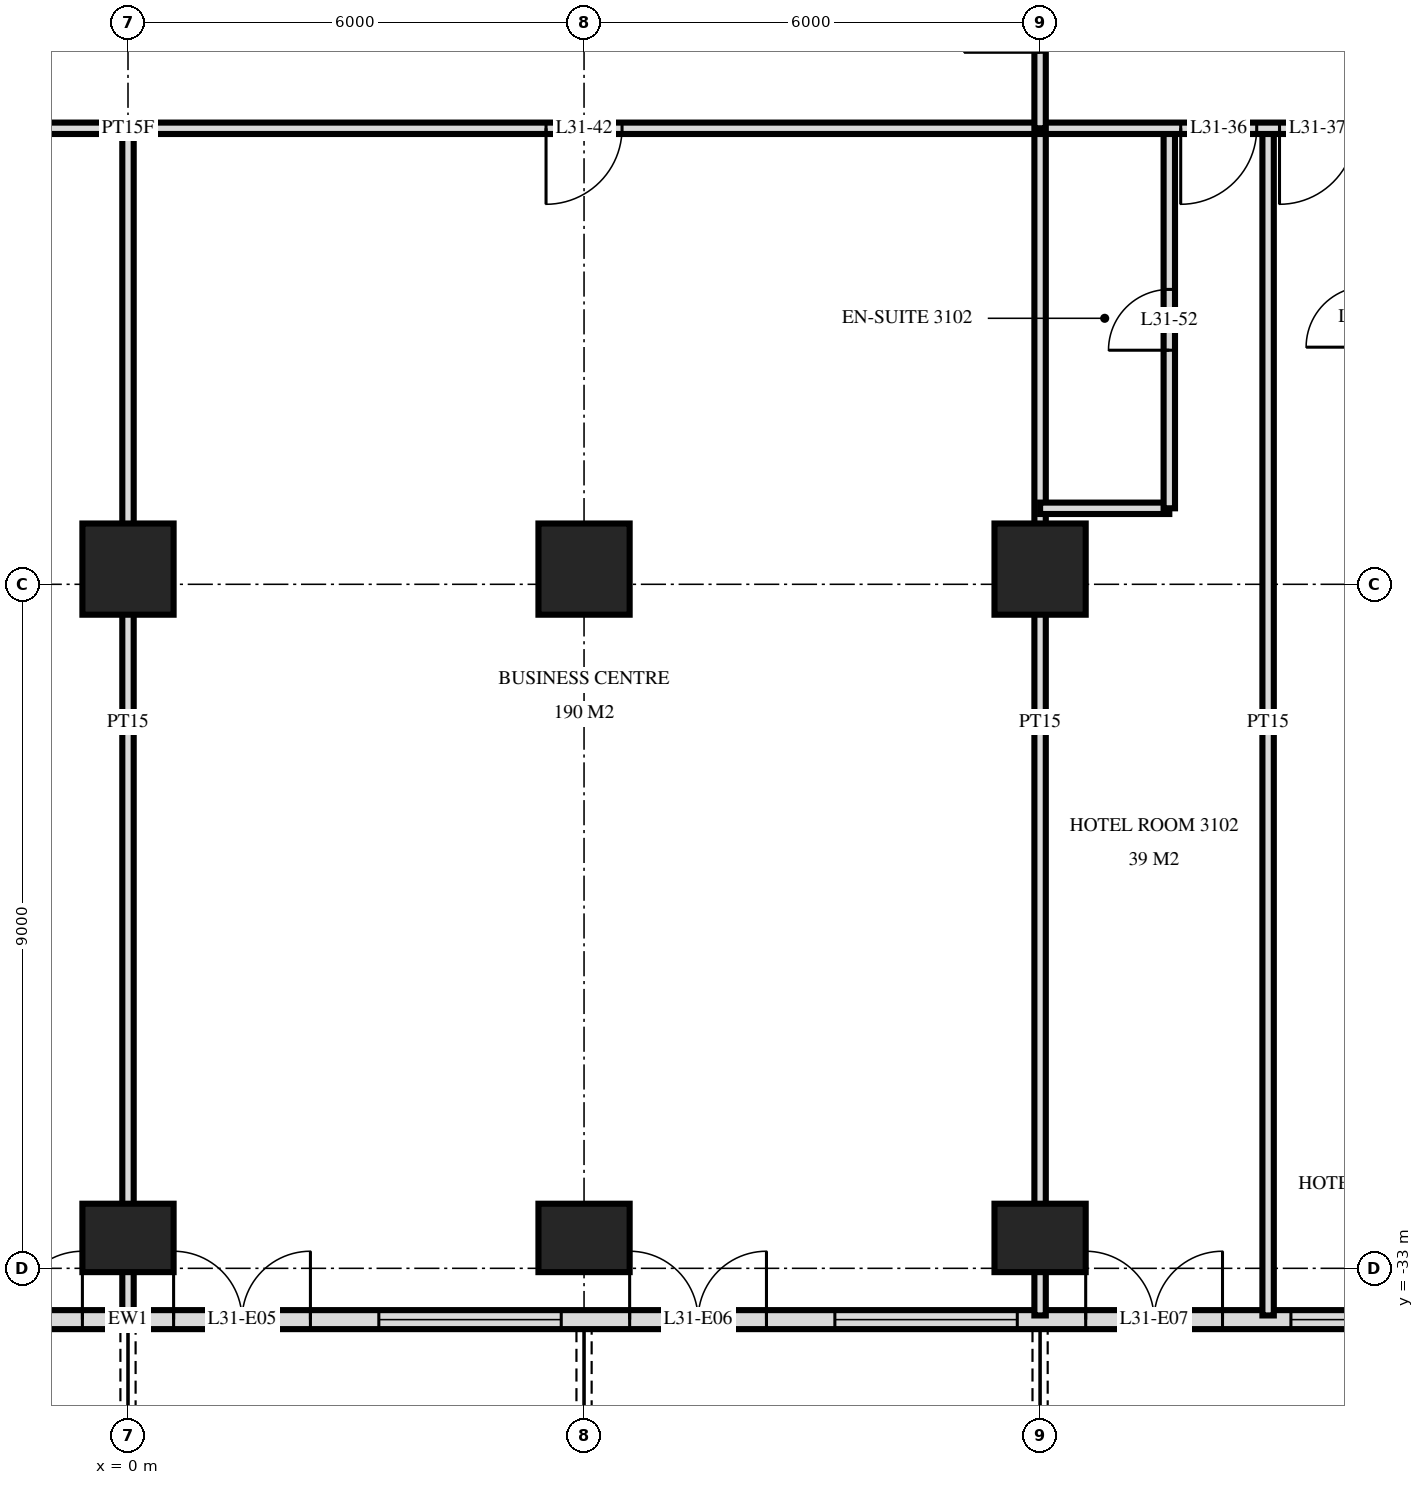
"""IFC4 building model, lengths in metres.
Left out: names, types, materials, properties, quantities, classifications, styles, units other than length and angle.
Written with IfcOpenShell. Run it as: python <this file> out.ifc"""

import sys

from ifc_helpers import new_model, si_unit, direction, frame, frame_2d, origin, origin_2d, place, context, subcontext, project, spatial, rectangle, extrude, element, fill, save


model = new_model("IFC4")
c1 = context("Model", 3, precision=1e-05, world=origin(), true_north=direction((0.0, 1.0)))
c2 = subcontext(c1, "Body", "Model", "MODEL_VIEW")
j1 = project(units=[si_unit("LENGTHUNIT", "METRE"), si_unit("PLANEANGLEUNIT", "RADIAN")], contexts=[c1])
p1 = place(None, origin())
s1 = spatial("IfcSite", under=j1, at=p1, CompositionType="ELEMENT")
p2 = place(p1, origin())
s2 = spatial("IfcBuilding", under=s1, at=p2, CompositionType="ELEMENT")
p3 = place(p2, frame((0.0, 0.0, 123.6)))
s3 = spatial("IfcBuildingStorey", under=s2, at=p3, CompositionType="ELEMENT", Elevation=123.6)
p4 = place(p3, frame((0.0, -32.6, 0.0), z_axis=(0.0, 0.0, 1.0), x_axis=(1.0, 0.0, 0.0)))
e1 = element("IfcColumn", 1, at=p4, inside=s3, PredefinedType="COLUMN", context=c2, shape_type="SweptSolid", body=[
    extrude(rectangle(XDim=1.2, YDim=0.9, at=origin_2d()), origin(), (0.0, 0.0, 1.0), 3.6),
])
p5 = place(p3, frame((0.0, -23.8, 0.0), z_axis=(0.0, 0.0, 1.0), x_axis=(1.0, 0.0, 0.0)))
e2 = element("IfcColumn", 2, at=p5, inside=s3, PredefinedType="COLUMN", context=c2, shape_type="SweptSolid", body=[
    extrude(rectangle(XDim=1.2, YDim=1.2, at=origin_2d()), origin(), (0.0, 0.0, 1.0), 3.6),
])
p6 = place(p3, frame((6.0, -32.6, 0.0), z_axis=(0.0, 0.0, 1.0), x_axis=(1.0, 0.0, 0.0)))
e3 = element("IfcColumn", 3, at=p6, inside=s3, PredefinedType="COLUMN", context=c2, shape_type="SweptSolid", body=[
    extrude(rectangle(XDim=1.2, YDim=0.9, at=origin_2d()), origin(), (0.0, 0.0, 1.0), 3.6),
])
p7 = place(p3, frame((6.0, -23.8, 0.0), z_axis=(0.0, 0.0, 1.0), x_axis=(1.0, 0.0, 0.0)))
e4 = element("IfcColumn", 4, at=p7, inside=s3, PredefinedType="COLUMN", context=c2, shape_type="SweptSolid", body=[
    extrude(rectangle(XDim=1.2, YDim=1.2, at=origin_2d()), origin(), (0.0, 0.0, 1.0), 3.6),
])
p8 = place(p3, frame((12.0, -32.6, 0.0), z_axis=(0.0, 0.0, 1.0), x_axis=(1.0, 0.0, 0.0)))
e5 = element("IfcColumn", 5, at=p8, inside=s3, PredefinedType="COLUMN", context=c2, shape_type="SweptSolid", body=[
    extrude(rectangle(XDim=1.2, YDim=0.9, at=origin_2d()), origin(), (0.0, 0.0, 1.0), 3.6),
])
p9 = place(p3, frame((12.0, -23.8, 0.0), z_axis=(0.0, 0.0, 1.0), x_axis=(1.0, 0.0, 0.0)))
e6 = element("IfcColumn", 6, at=p9, inside=s3, PredefinedType="COLUMN", context=c2, shape_type="SweptSolid", body=[
    extrude(rectangle(XDim=1.2, YDim=1.2, at=origin_2d()), origin(), (0.0, 0.0, 1.0), 3.6),
])
p10 = place(p3, frame((-23.675, -33.675, 0.0), z_axis=(0.0, 0.0, 1.0), x_axis=(1.0, 0.0, 0.0)))
e7 = element("IfcWall", 7, at=p10, inside=s3, PredefinedType="SOLIDWALL", context=c2, shape_type="SweptSolid", body=[
    extrude(rectangle(XDim=47.351, YDim=0.25, at=frame_2d((23.675, 0.0))), origin(), (0.0, 0.0, 1.0), 3.32),
])
p11 = place(p10, frame((3.425, 0.0, 0.0)))
e8 = element("IfcOpeningElement", 8, at=p11, cuts=e7, PredefinedType="OPENING", context=c2, shape_type="SweptSolid", body=[
    extrude(rectangle(XDim=1.8, YDim=2.4, at=frame_2d((0.9, 1.2))), frame((0.0, 0.135, 0.0), z_axis=(0.0, -1.0, 0.0), x_axis=(1.0, 0.0, 0.0)), (0.0, 0.0, 1.0), 0.27),
])
p12 = place(p10, frame((6.275, 0.0, 0.0)))
e9 = element("IfcOpeningElement", 9, at=p12, cuts=e7, PredefinedType="OPENING", context=c2, shape_type="SweptSolid", body=[
    extrude(rectangle(XDim=1.8, YDim=2.4, at=frame_2d((0.9, 1.2))), frame((0.0, 0.135, 0.0), z_axis=(0.0, -1.0, 0.0), x_axis=(1.0, 0.0, 0.0)), (0.0, 0.0, 1.0), 0.27),
])
p13 = place(p10, frame((8.975, 0.0, 0.3)))
e10 = element("IfcOpeningElement", 10, at=p13, cuts=e7, PredefinedType="OPENING", context=c2, shape_type="SweptSolid", body=[
    extrude(rectangle(XDim=2.4, YDim=2.1, at=frame_2d((1.2, 1.05))), frame((0.0, 0.135, 0.0), z_axis=(0.0, -1.0, 0.0), x_axis=(1.0, 0.0, 0.0)), (0.0, 0.0, 1.0), 0.27),
])
p14 = place(p10, frame((12.275, 0.0, 0.0)))
e11 = element("IfcOpeningElement", 11, at=p14, cuts=e7, PredefinedType="OPENING", context=c2, shape_type="SweptSolid", body=[
    extrude(rectangle(XDim=1.8, YDim=2.4, at=frame_2d((0.9, 1.2))), frame((0.0, 0.135, 0.0), z_axis=(0.0, -1.0, 0.0), x_axis=(1.0, 0.0, 0.0)), (0.0, 0.0, 1.0), 0.27),
])
p15 = place(p10, frame((14.975, 0.0, 0.3)))
e12 = element("IfcOpeningElement", 12, at=p15, cuts=e7, PredefinedType="OPENING", context=c2, shape_type="SweptSolid", body=[
    extrude(rectangle(XDim=2.4, YDim=2.1, at=frame_2d((1.2, 1.05))), frame((0.0, 0.135, 0.0), z_axis=(0.0, -1.0, 0.0), x_axis=(1.0, 0.0, 0.0)), (0.0, 0.0, 1.0), 0.27),
])
p16 = place(p10, frame((17.975, 0.0, 0.3)))
e13 = element("IfcOpeningElement", 13, at=p16, cuts=e7, PredefinedType="OPENING", context=c2, shape_type="SweptSolid", body=[
    extrude(rectangle(XDim=2.4, YDim=2.1, at=frame_2d((1.2, 1.05))), frame((0.0, 0.135, 0.0), z_axis=(0.0, -1.0, 0.0), x_axis=(1.0, 0.0, 0.0)), (0.0, 0.0, 1.0), 0.27),
])
p17 = place(p10, frame((21.275, 0.0, 0.0)))
e14 = element("IfcOpeningElement", 14, at=p17, cuts=e7, PredefinedType="OPENING", context=c2, shape_type="SweptSolid", body=[
    extrude(rectangle(XDim=1.8, YDim=2.4, at=frame_2d((0.9, 1.2))), frame((0.0, 0.135, 0.0), z_axis=(0.0, -1.0, 0.0), x_axis=(1.0, 0.0, 0.0)), (0.0, 0.0, 1.0), 0.27),
])
p18 = place(p10, frame((24.275, 0.0, 0.0)))
e15 = element("IfcOpeningElement", 15, at=p18, cuts=e7, PredefinedType="OPENING", context=c2, shape_type="SweptSolid", body=[
    extrude(rectangle(XDim=1.8, YDim=2.4, at=frame_2d((0.9, 1.2))), frame((0.0, 0.135, 0.0), z_axis=(0.0, -1.0, 0.0), x_axis=(1.0, 0.0, 0.0)), (0.0, 0.0, 1.0), 0.27),
])
p19 = place(p10, frame((26.975, 0.0, 0.3)))
e16 = element("IfcOpeningElement", 16, at=p19, cuts=e7, PredefinedType="OPENING", context=c2, shape_type="SweptSolid", body=[
    extrude(rectangle(XDim=2.4, YDim=2.1, at=frame_2d((1.2, 1.05))), frame((0.0, 0.135, 0.0), z_axis=(0.0, -1.0, 0.0), x_axis=(1.0, 0.0, 0.0)), (0.0, 0.0, 1.0), 0.27),
])
p20 = place(p10, frame((30.275, 0.0, 0.0)))
e17 = element("IfcOpeningElement", 17, at=p20, cuts=e7, PredefinedType="OPENING", context=c2, shape_type="SweptSolid", body=[
    extrude(rectangle(XDim=1.8, YDim=2.4, at=frame_2d((0.9, 1.2))), frame((0.0, 0.135, 0.0), z_axis=(0.0, -1.0, 0.0), x_axis=(1.0, 0.0, 0.0)), (0.0, 0.0, 1.0), 0.27),
])
p21 = place(p10, frame((32.975, 0.0, 0.3)))
e18 = element("IfcOpeningElement", 18, at=p21, cuts=e7, PredefinedType="OPENING", context=c2, shape_type="SweptSolid", body=[
    extrude(rectangle(XDim=2.4, YDim=2.1, at=frame_2d((1.2, 1.05))), frame((0.0, 0.135, 0.0), z_axis=(0.0, -1.0, 0.0), x_axis=(1.0, 0.0, 0.0)), (0.0, 0.0, 1.0), 0.27),
])
p22 = place(p10, frame((36.275, 0.0, 0.0)))
e19 = element("IfcOpeningElement", 19, at=p22, cuts=e7, PredefinedType="OPENING", context=c2, shape_type="SweptSolid", body=[
    extrude(rectangle(XDim=1.8, YDim=2.4, at=frame_2d((0.9, 1.2))), frame((0.0, 0.135, 0.0), z_axis=(0.0, -1.0, 0.0), x_axis=(1.0, 0.0, 0.0)), (0.0, 0.0, 1.0), 0.27),
])
p23 = place(p10, frame((38.975, 0.0, 0.3)))
e20 = element("IfcOpeningElement", 20, at=p23, cuts=e7, PredefinedType="OPENING", context=c2, shape_type="SweptSolid", body=[
    extrude(rectangle(XDim=2.4, YDim=2.1, at=frame_2d((1.2, 1.05))), frame((0.0, 0.135, 0.0), z_axis=(0.0, -1.0, 0.0), x_axis=(1.0, 0.0, 0.0)), (0.0, 0.0, 1.0), 0.27),
])
p24 = place(p10, frame((41.975, 0.0, 0.3)))
e21 = element("IfcOpeningElement", 21, at=p24, cuts=e7, PredefinedType="OPENING", context=c2, shape_type="SweptSolid", body=[
    extrude(rectangle(XDim=2.4, YDim=2.1, at=frame_2d((1.2, 1.05))), frame((0.0, 0.135, 0.0), z_axis=(0.0, -1.0, 0.0), x_axis=(1.0, 0.0, 0.0)), (0.0, 0.0, 1.0), 0.27),
])
p25 = place(p10, frame((45.125, 0.0, 0.0)))
e22 = element("IfcOpeningElement", 22, at=p25, cuts=e7, PredefinedType="OPENING", context=c2, shape_type="SweptSolid", body=[
    extrude(rectangle(XDim=1.8, YDim=2.4, at=frame_2d((0.9, 1.2))), frame((0.0, 0.135, 0.0), z_axis=(0.0, -1.0, 0.0), x_axis=(1.0, 0.0, 0.0)), (0.0, 0.0, 1.0), 0.27),
])
p26 = place(p3, frame((15.0, -33.62, 0.0), z_axis=(0.0, 0.0, 1.0), x_axis=(0.0, 1.0, 0.0)))
e23 = element("IfcWall", 23, at=p26, inside=s3, PredefinedType="PARTITIONING", context=c2, shape_type="SweptSolid", body=[
    extrude(rectangle(XDim=15.62, YDim=0.15, at=frame_2d((7.81, 0.0))), origin(), (0.0, 0.0, 1.0), 3.32),
])
p27 = place(p3, frame((13.7, -23.0, 0.0), z_axis=(0.0, 0.0, 1.0), x_axis=(0.0, 1.0, 0.0)))
e24 = element("IfcWall", 24, at=p27, inside=s3, PredefinedType="PARTITIONING", context=c2, shape_type="SweptSolid", body=[
    extrude(rectangle(XDim=5.0, YDim=0.15, at=frame_2d((2.5, 0.0))), origin(), (0.0, 0.0, 1.0), 3.32),
])
p28 = place(p27, frame((2.08, 0.0, 0.0)))
e25 = element("IfcOpeningElement", 25, at=p28, cuts=e24, PredefinedType="OPENING", context=c2, shape_type="SweptSolid", body=[
    extrude(rectangle(XDim=0.8, YDim=2.1, at=frame_2d((0.4, 1.05))), frame((0.0, 0.085, 0.0), z_axis=(0.0, -1.0, 0.0), x_axis=(1.0, 0.0, 0.0)), (0.0, 0.0, 1.0), 0.17),
])
p29 = place(p3, frame((12.0, -18.0, 0.0), z_axis=(0.0, 0.0, 1.0), x_axis=(0.0, 1.0, 0.0)))
e26 = element("IfcWall", 26, at=p29, inside=s3, PredefinedType="PARTITIONING", context=c2, shape_type="SweptSolid", body=[
    extrude(rectangle(XDim=2.95, YDim=0.15, at=frame_2d((1.475, 0.0))), origin(), (0.0, 0.0, 1.0), 3.32),
])
p30 = place(p29, frame((1.0, 0.0, 0.0)))
e27 = element("IfcOpeningElement", 27, at=p30, cuts=e26, PredefinedType="OPENING", context=c2, shape_type="SweptSolid", body=[
    extrude(rectangle(XDim=1.0, YDim=2.1, at=frame_2d((0.5, 1.05))), frame((0.0, 0.085, 0.0), z_axis=(0.0, -1.0, 0.0), x_axis=(1.0, 0.0, 0.0)), (0.0, 0.0, 1.0), 0.17),
])
for number, where, z_axis, x_axis in (
    (28, (12.0, -33.62, 0.0), (0.0, 0.0, 1.0), (0.0, 1.0, 0.0)),
    (29, (0.0, -33.62, 0.0), (0.0, 0.0, 1.0), (0.0, 1.0, 0.0)),
):
    element("IfcWall", number, at=place(p3, frame(where, z_axis=z_axis, x_axis=x_axis)), inside=s3, PredefinedType="PARTITIONING", context=c2, shape_type="SweptSolid", body=[
        extrude(rectangle(XDim=15.62, YDim=0.15, at=frame_2d((7.81, 0.0))), origin(), (0.0, 0.0, 1.0), 3.32),
    ])
p31 = place(p3, frame((12.0, -23.0, 0.0), z_axis=(0.0, 0.0, 1.0), x_axis=(1.0, 0.0, 0.0)))
e30 = element("IfcWall", 30, at=p31, inside=s3, PredefinedType="PARTITIONING", context=c2, shape_type="SweptSolid", body=[
    extrude(rectangle(XDim=1.7, YDim=0.15, at=frame_2d((0.85, 0.0))), origin(), (0.0, 0.0, 1.0), 3.32),
])
p32 = place(p3, frame((-28.02, -18.0, 0.0), z_axis=(0.0, 0.0, 1.0), x_axis=(1.0, 0.0, 0.0)))
e31 = element("IfcWall", 31, at=p32, inside=s3, PredefinedType="PARTITIONING", context=c2, shape_type="SweptSolid", body=[
    extrude(rectangle(XDim=56.04, YDim=0.15, at=frame_2d((28.02, 0.0))), origin(), (0.0, 0.0, 1.0), 3.32),
])
p33 = place(p32, frame((13.17, 0.0, 0.0)))
e32 = element("IfcOpeningElement", 32, at=p33, cuts=e31, PredefinedType="OPENING", context=c2, shape_type="SweptSolid", body=[
    extrude(rectangle(XDim=1.0, YDim=2.1, at=frame_2d((0.5, 1.05))), frame((0.0, 0.085, 0.0), z_axis=(0.0, -1.0, 0.0), x_axis=(1.0, 0.0, 0.0)), (0.0, 0.0, 1.0), 0.17),
])
p34 = place(p32, frame((11.32, 0.0, 0.0)))
e33 = element("IfcOpeningElement", 33, at=p34, cuts=e31, PredefinedType="OPENING", context=c2, shape_type="SweptSolid", body=[
    extrude(rectangle(XDim=1.0, YDim=2.1, at=frame_2d((0.5, 1.05))), frame((0.0, 0.085, 0.0), z_axis=(0.0, -1.0, 0.0), x_axis=(1.0, 0.0, 0.0)), (0.0, 0.0, 1.0), 0.17),
])
p35 = place(p32, frame((41.87, 0.0, 0.0)))
e34 = element("IfcOpeningElement", 34, at=p35, cuts=e31, PredefinedType="OPENING", context=c2, shape_type="SweptSolid", body=[
    extrude(rectangle(XDim=1.0, YDim=2.1, at=frame_2d((0.5, 1.05))), frame((0.0, 0.085, 0.0), z_axis=(0.0, -1.0, 0.0), x_axis=(1.0, 0.0, 0.0)), (0.0, 0.0, 1.0), 0.17),
])
p36 = place(p32, frame((43.17, 0.0, 0.0)))
e35 = element("IfcOpeningElement", 35, at=p36, cuts=e31, PredefinedType="OPENING", context=c2, shape_type="SweptSolid", body=[
    extrude(rectangle(XDim=1.0, YDim=2.1, at=frame_2d((0.5, 1.05))), frame((0.0, 0.085, 0.0), z_axis=(0.0, -1.0, 0.0), x_axis=(1.0, 0.0, 0.0)), (0.0, 0.0, 1.0), 0.17),
])
p37 = place(p32, frame((46.72, 0.0, 0.0)))
e36 = element("IfcOpeningElement", 36, at=p37, cuts=e31, PredefinedType="OPENING", context=c2, shape_type="SweptSolid", body=[
    extrude(rectangle(XDim=1.0, YDim=2.1, at=frame_2d((0.5, 1.05))), frame((0.0, 0.085, 0.0), z_axis=(0.0, -1.0, 0.0), x_axis=(1.0, 0.0, 0.0)), (0.0, 0.0, 1.0), 0.17),
])
p38 = place(p32, frame((21.52, 0.0, 0.0)))
e37 = element("IfcOpeningElement", 37, at=p38, cuts=e31, PredefinedType="OPENING", context=c2, shape_type="SweptSolid", body=[
    extrude(rectangle(XDim=1.0, YDim=2.1, at=frame_2d((0.5, 1.05))), frame((0.0, 0.085, 0.0), z_axis=(0.0, -1.0, 0.0), x_axis=(1.0, 0.0, 0.0)), (0.0, 0.0, 1.0), 0.17),
])
p39 = place(p32, frame((33.52, 0.0, 0.0)))
e38 = element("IfcOpeningElement", 38, at=p39, cuts=e31, PredefinedType="OPENING", context=c2, shape_type="SweptSolid", body=[
    extrude(rectangle(XDim=1.0, YDim=2.1, at=frame_2d((0.5, 1.05))), frame((0.0, 0.085, 0.0), z_axis=(0.0, -1.0, 0.0), x_axis=(1.0, 0.0, 0.0)), (0.0, 0.0, 1.0), 0.17),
])
p40 = place(p17, origin())
e39 = element("IfcDoor", 39, at=p40, inside=s3, OperationType="DOUBLE_DOOR_SINGLE_SWING", PredefinedType="DOOR", context=c2, shape_type="SweptSolid", body=[
    extrude(rectangle(XDim=1.8, YDim=2.4, at=frame_2d((0.9, 1.2))), frame((0.0, 0.025, 0.0), z_axis=(0.0, -1.0, 0.0), x_axis=(1.0, 0.0, 0.0)), (0.0, 0.0, 1.0), 0.05),
])
fill(e14, e39)
p41 = place(p18, origin())
e40 = element("IfcDoor", 40, at=p41, inside=s3, OperationType="DOUBLE_DOOR_SINGLE_SWING", PredefinedType="DOOR", context=c2, shape_type="SweptSolid", body=[
    extrude(rectangle(XDim=1.8, YDim=2.4, at=frame_2d((0.9, 1.2))), frame((0.0, 0.025, 0.0), z_axis=(0.0, -1.0, 0.0), x_axis=(1.0, 0.0, 0.0)), (0.0, 0.0, 1.0), 0.05),
])
fill(e15, e40)
p42 = place(p19, origin())
e41 = element("IfcWindow", 41, at=p42, inside=s3, PartitioningType="SINGLE_PANEL", PredefinedType="WINDOW", context=c2, shape_type="SweptSolid", body=[
    extrude(rectangle(XDim=2.4, YDim=2.1, at=frame_2d((1.2, 1.05))), frame((0.0, 0.03, 0.0), z_axis=(0.0, -1.0, 0.0), x_axis=(1.0, 0.0, 0.0)), (0.0, 0.0, 1.0), 0.06),
])
fill(e16, e41)
p43 = place(p20, origin())
e42 = element("IfcDoor", 42, at=p43, inside=s3, OperationType="DOUBLE_DOOR_SINGLE_SWING", PredefinedType="DOOR", context=c2, shape_type="SweptSolid", body=[
    extrude(rectangle(XDim=1.8, YDim=2.4, at=frame_2d((0.9, 1.2))), frame((0.0, 0.025, 0.0), z_axis=(0.0, -1.0, 0.0), x_axis=(1.0, 0.0, 0.0)), (0.0, 0.0, 1.0), 0.05),
])
fill(e17, e42)
p44 = place(p21, origin())
e43 = element("IfcWindow", 43, at=p44, inside=s3, PartitioningType="SINGLE_PANEL", PredefinedType="WINDOW", context=c2, shape_type="SweptSolid", body=[
    extrude(rectangle(XDim=2.4, YDim=2.1, at=frame_2d((1.2, 1.05))), frame((0.0, 0.03, 0.0), z_axis=(0.0, -1.0, 0.0), x_axis=(1.0, 0.0, 0.0)), (0.0, 0.0, 1.0), 0.06),
])
fill(e18, e43)
p45 = place(p22, origin())
e44 = element("IfcDoor", 44, at=p45, inside=s3, OperationType="DOUBLE_DOOR_SINGLE_SWING", PredefinedType="DOOR", context=c2, shape_type="SweptSolid", body=[
    extrude(rectangle(XDim=1.8, YDim=2.4, at=frame_2d((0.9, 1.2))), frame((0.0, 0.025, 0.0), z_axis=(0.0, -1.0, 0.0), x_axis=(1.0, 0.0, 0.0)), (0.0, 0.0, 1.0), 0.05),
])
fill(e19, e44)
p46 = place(p23, origin())
e45 = element("IfcWindow", 45, at=p46, inside=s3, PartitioningType="SINGLE_PANEL", PredefinedType="WINDOW", context=c2, shape_type="SweptSolid", body=[
    extrude(rectangle(XDim=2.4, YDim=2.1, at=frame_2d((1.2, 1.05))), frame((0.0, 0.03, 0.0), z_axis=(0.0, -1.0, 0.0), x_axis=(1.0, 0.0, 0.0)), (0.0, 0.0, 1.0), 0.06),
])
fill(e20, e45)
p47 = place(p35, frame((0.5, 0.0, 0.0), z_axis=(0.0, 0.0, 1.0), x_axis=(-1.0, 0.0, 0.0)))
e46 = element("IfcDoor", 46, at=p47, inside=s3, OperationType="SINGLE_SWING_LEFT", PredefinedType="DOOR", context=c2, shape_type="SweptSolid", body=[
    extrude(rectangle(XDim=1.0, YDim=2.1, at=frame_2d((0.0, 1.05))), frame((0.0, -0.025, 0.0), z_axis=(0.0, 1.0, 0.0), x_axis=(-1.0, 0.0, 0.0)), (0.0, 0.0, 1.0), 0.05),
])
fill(e34, e46)
p48 = place(p36, frame((0.5, 0.0, 0.0), z_axis=(0.0, 0.0, 1.0), x_axis=(-1.0, 0.0, 0.0)))
e47 = element("IfcDoor", 47, at=p48, inside=s3, OperationType="SINGLE_SWING_LEFT", PredefinedType="DOOR", context=c2, shape_type="SweptSolid", body=[
    extrude(rectangle(XDim=1.0, YDim=2.1, at=frame_2d((0.0, 1.05))), frame((0.0, -0.025, 0.0), z_axis=(0.0, 1.0, 0.0), x_axis=(-1.0, 0.0, 0.0)), (0.0, 0.0, 1.0), 0.05),
])
fill(e35, e47)
p49 = place(p39, frame((0.5, 0.0, 0.0), z_axis=(0.0, 0.0, 1.0), x_axis=(-1.0, 0.0, 0.0)))
e48 = element("IfcDoor", 48, at=p49, inside=s3, OperationType="SINGLE_SWING_LEFT", PredefinedType="DOOR", context=c2, shape_type="SweptSolid", body=[
    extrude(rectangle(XDim=1.0, YDim=2.1, at=frame_2d((0.0, 1.05))), frame((0.0, -0.025, 0.0), z_axis=(0.0, 1.0, 0.0), x_axis=(-1.0, 0.0, 0.0)), (0.0, 0.0, 1.0), 0.05),
])
fill(e38, e48)
p50 = place(p28, origin())
e49 = element("IfcDoor", 49, at=p50, inside=s3, OperationType="SINGLE_SWING_RIGHT", PredefinedType="DOOR", context=c2, shape_type="SweptSolid", body=[
    extrude(rectangle(XDim=0.8, YDim=2.1, at=frame_2d((0.4, 1.05))), frame((0.0, 0.025, 0.0), z_axis=(0.0, -1.0, 0.0), x_axis=(1.0, 0.0, 0.0)), (0.0, 0.0, 1.0), 0.05),
])
fill(e25, e49)
save(model, sys.argv[1])
